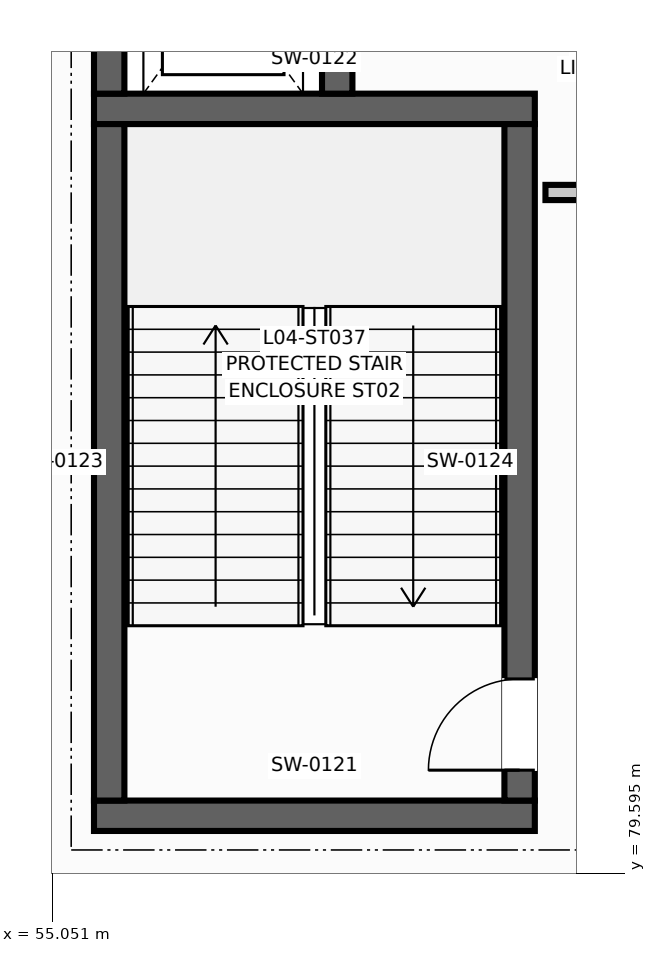
"""IFC4 building model, lengths in metres.
Left out: names, types, materials, properties, quantities, classifications, styles, units other than length and angle.
Written with IfcOpenShell. Run it as: python <this file> out.ifc"""

import sys

from ifc_helpers import new_model, si_unit, direction, frame, frame_2d, origin, place, context, subcontext, project, spatial, rectangle, extrude, element, fill, save


model = new_model("IFC4")
c1 = context("Model", 3, precision=1e-05, world=origin(), true_north=direction((0.0, 1.0)))
c2 = subcontext(c1, "Body", "Model", "MODEL_VIEW")
j1 = project(units=[si_unit("LENGTHUNIT", "METRE"), si_unit("PLANEANGLEUNIT", "RADIAN")], contexts=[c1])
p1 = place(None, origin())
s1 = spatial("IfcSite", under=j1, at=p1, CompositionType="ELEMENT")
p2 = place(p1, origin())
s2 = spatial("IfcBuilding", under=s1, at=p2, CompositionType="ELEMENT")
p3 = place(p2, frame((0.0, 0.0, 18.0)))
s3 = spatial("IfcBuildingStorey", under=s2, at=p3, CompositionType="ELEMENT", Elevation=18.0)
for number, where, z_axis, x_axis in (
    (1, (55.6, 80.35, 0.0), (0.0, 0.0, 1.0), (1.0, 0.0, 0.0)),
    (2, (55.6, 89.65, 0.0), (0.0, 0.0, 1.0), (1.0, 0.0, 0.0)),
):
    element("IfcWall", number, at=place(p3, frame(where, z_axis=z_axis, x_axis=x_axis)), inside=s3, PredefinedType="SHEAR", context=c2, shape_type="SweptSolid", body=[
        extrude(rectangle(XDim=5.8, YDim=0.4, at=frame_2d((2.9, 0.0))), origin(), (0.0, 0.0, 1.0), 4.25),
    ])
p4 = place(p3, frame((55.8, 80.55, 0.0), z_axis=(0.0, 0.0, 1.0), x_axis=(0.0, 1.0, 0.0)))
e3 = element("IfcWall", 3, at=p4, inside=s3, PredefinedType="SHEAR", context=c2, shape_type="SweptSolid", body=[
    extrude(rectangle(XDim=8.9, YDim=0.4, at=frame_2d((4.45, 0.0))), origin(), (0.0, 0.0, 1.0), 4.25),
])
p5 = place(p3, frame((61.2, 80.55, 0.0), z_axis=(0.0, 0.0, 1.0), x_axis=(0.0, 1.0, 0.0)))
e4 = element("IfcWall", 4, at=p5, inside=s3, PredefinedType="SHEAR", context=c2, shape_type="SweptSolid", body=[
    extrude(rectangle(XDim=8.9, YDim=0.4, at=frame_2d((4.45, 0.0))), origin(), (0.0, 0.0, 1.0), 4.25),
])
p6 = place(p5, frame((0.4, 0.0, 0.0)))
e5 = element("IfcOpeningElement", 5, at=p6, cuts=e4, PredefinedType="OPENING", context=c2, shape_type="SweptSolid", body=[
    extrude(rectangle(XDim=1.2, YDim=2.2, at=frame_2d((0.6, 1.1))), frame((0.0, 0.21, 0.0), z_axis=(0.0, -1.0, 0.0), x_axis=(1.0, 0.0, 0.0)), (0.0, 0.0, 1.0), 0.42),
])
p7 = place(p3, frame((55.8, 89.85, 0.0), z_axis=(0.0, 0.0, 1.0), x_axis=(0.0, 1.0, 0.0)))
e6 = element("IfcWall", 6, at=p7, inside=s3, PredefinedType="SHEAR", context=c2, shape_type="SweptSolid", body=[
    extrude(rectangle(XDim=2.9, YDim=0.4, at=frame_2d((1.45, 0.0))), origin(), (0.0, 0.0, 1.0), 4.25),
])
p8 = place(p3, frame((58.8, 89.85, 0.0), z_axis=(0.0, 0.0, 1.0), x_axis=(0.0, 1.0, 0.0)))
e7 = element("IfcWall", 7, at=p8, inside=s3, PredefinedType="SHEAR", context=c2, shape_type="SweptSolid", body=[
    extrude(rectangle(XDim=2.9, YDim=0.4, at=frame_2d((1.45, 0.0))), origin(), (0.0, 0.0, 1.0), 4.25),
])
p9 = place(p8, frame((0.9, 0.0, 0.0)))
e8 = element("IfcOpeningElement", 8, at=p9, cuts=e7, PredefinedType="OPENING", context=c2, shape_type="SweptSolid", body=[
    extrude(rectangle(XDim=1.1, YDim=2.2, at=frame_2d((0.55, 1.1))), frame((0.0, 0.21, 0.0), z_axis=(0.0, -1.0, 0.0), x_axis=(1.0, 0.0, 0.0)), (0.0, 0.0, 1.0), 0.42),
])
p10 = place(p3, frame((61.54, 88.55, 0.0), z_axis=(0.0, 0.0, 1.0), x_axis=(1.0, 0.0, 0.0)))
e9 = element("IfcWall", 9, at=p10, inside=s3, PredefinedType="PARTITIONING", context=c2, shape_type="SweptSolid", body=[
    extrude(rectangle(XDim=4.18, YDim=0.2, at=frame_2d((2.09, 0.0))), origin(), (0.0, 0.0, 1.0), 3.22),
])
p11 = place(p6, origin())
e10 = element("IfcDoor", 10, at=p11, inside=s3, OperationType="SINGLE_SWING_LEFT", PredefinedType="DOOR", context=c2, shape_type="SweptSolid", body=[
    extrude(rectangle(XDim=1.2, YDim=2.2, at=frame_2d((0.6, 1.1))), frame((0.0, 0.025, 0.0), z_axis=(0.0, -1.0, 0.0), x_axis=(1.0, 0.0, 0.0)), (0.0, 0.0, 1.0), 0.05),
])
fill(e5, e10)
save(model, sys.argv[1])
